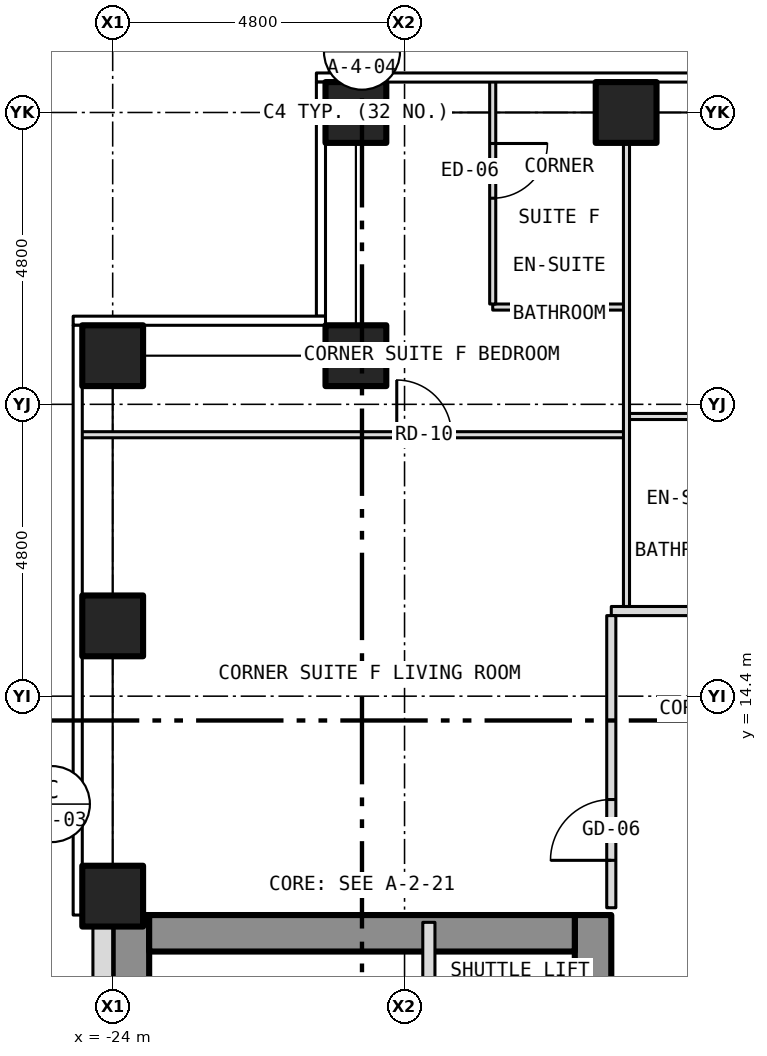
"""IFC4 building model, lengths in metres.
Left out: names, types, materials, properties, quantities, classifications, styles, units other than length and angle.
Written with IfcOpenShell. Run it as: python <this file> out.ifc"""

import sys

from ifc_helpers import new_model, si_unit, direction, frame, frame_2d, origin, origin_2d, place, context, subcontext, project, spatial, rectangle, hollow_rectangle, extrude, element, fill, save


model = new_model("IFC4")
c1 = context("Model", 3, precision=1e-05, world=origin(), true_north=direction((0.0, 1.0)))
c2 = subcontext(c1, "Body", "Model", "MODEL_VIEW")
j1 = project(units=[si_unit("LENGTHUNIT", "METRE"), si_unit("PLANEANGLEUNIT", "RADIAN")], contexts=[c1])
p1 = place(None, origin())
s1 = spatial("IfcSite", under=j1, at=p1, CompositionType="ELEMENT")
p2 = place(p1, origin())
s2 = spatial("IfcBuilding", under=s1, at=p2, CompositionType="ELEMENT")
p3 = place(p2, frame((0.0, 0.0, 77.5)))
s3 = spatial("IfcBuildingStorey", under=s2, at=p3, CompositionType="ELEMENT", Elevation=77.5)
for number, where, z_axis, x_axis in (
    (1, (-20.0, 24.0, -0.15), (0.0, 0.0, 1.0), (1.0, 0.0, 0.0)),
    (2, (-15.556, 24.0, -0.15), (0.0, 0.0, 1.0), (1.0, 0.0, 0.0)),
    (3, (-24.0, 11.111, -0.15), (0.0, 0.0, 1.0), (1.0, 0.0, 0.0)),
    (4, (-24.0, 15.556, -0.15), (0.0, 0.0, 1.0), (1.0, 0.0, 0.0)),
    (5, (-24.0, 20.0, -0.15), (0.0, 0.0, 1.0), (1.0, 0.0, 0.0)),
    (6, (-20.0, 20.0, -0.15), (0.0, 0.0, 1.0), (1.0, 0.0, 0.0)),
):
    element("IfcColumn", number, at=place(p3, frame(where, z_axis=z_axis, x_axis=x_axis)), inside=s3, PredefinedType="COLUMN", context=c2, shape_type="SweptSolid", body=[
        extrude(hollow_rectangle(XDim=1.0, YDim=1.0, WallThickness=0.06, at=origin_2d()), origin(), (0.0, 0.0, 1.0), 3.5),
    ])
p4 = place(p3, frame((-16.1, -10.8, 0.0), z_axis=(0.0, 0.0, 1.0), x_axis=(0.0, 1.0, 0.0)))
e7 = element("IfcWall", 7, at=p4, inside=s3, PredefinedType="SHEAR", context=c2, shape_type="SweptSolid", body=[
    extrude(rectangle(XDim=21.6, YDim=0.6, at=frame_2d((10.8, 0.0))), origin(), (0.0, 0.0, 1.0), 3.25),
])
p5 = place(p4, frame((9.4, 0.0, 0.0)))
e8 = element("IfcOpeningElement", 8, at=p5, cuts=e7, PredefinedType="OPENING", context=c2, shape_type="SweptSolid", body=[
    extrude(rectangle(XDim=1.1, YDim=2.1, at=frame_2d((0.55, 1.05))), frame((0.0, 0.312, 0.0), z_axis=(0.0, -1.0, 0.0), x_axis=(1.0, 0.0, 0.0)), (0.0, 0.0, 1.0), 0.624),
])
p6 = place(p4, frame((11.5, 0.0, 0.0)))
e9 = element("IfcOpeningElement", 9, at=p6, cuts=e7, PredefinedType="OPENING", context=c2, shape_type="SweptSolid", body=[
    extrude(rectangle(XDim=1.1, YDim=2.1, at=frame_2d((0.55, 1.05))), frame((0.0, 0.312, 0.0), z_axis=(0.0, -1.0, 0.0), x_axis=(1.0, 0.0, 0.0)), (0.0, 0.0, 1.0), 0.624),
])
p7 = place(p4, frame((13.6, 0.0, 0.0)))
e10 = element("IfcOpeningElement", 10, at=p7, cuts=e7, PredefinedType="OPENING", context=c2, shape_type="SweptSolid", body=[
    extrude(rectangle(XDim=1.1, YDim=2.1, at=frame_2d((0.55, 1.05))), frame((0.0, 0.312, 0.0), z_axis=(0.0, -1.0, 0.0), x_axis=(1.0, 0.0, 0.0)), (0.0, 0.0, 1.0), 0.624),
])
p8 = place(p4, frame((15.7, 0.0, 0.0)))
e11 = element("IfcOpeningElement", 11, at=p8, cuts=e7, PredefinedType="OPENING", context=c2, shape_type="SweptSolid", body=[
    extrude(rectangle(XDim=1.1, YDim=2.1, at=frame_2d((0.55, 1.05))), frame((0.0, 0.312, 0.0), z_axis=(0.0, -1.0, 0.0), x_axis=(1.0, 0.0, 0.0)), (0.0, 0.0, 1.0), 0.624),
])
p9 = place(p4, frame((17.8, 0.0, 0.0)))
e12 = element("IfcOpeningElement", 12, at=p9, cuts=e7, PredefinedType="OPENING", context=c2, shape_type="SweptSolid", body=[
    extrude(rectangle(XDim=1.1, YDim=2.1, at=frame_2d((0.55, 1.05))), frame((0.0, 0.312, 0.0), z_axis=(0.0, -1.0, 0.0), x_axis=(1.0, 0.0, 0.0)), (0.0, 0.0, 1.0), 0.624),
])
p10 = place(p4, frame((0.758, 0.0, 0.0)))
e13 = element("IfcOpeningElement", 13, at=p10, cuts=e7, PredefinedType="OPENING", context=c2, shape_type="SweptSolid", body=[
    extrude(rectangle(XDim=1.1, YDim=2.1, at=frame_2d((0.55, 1.05))), frame((0.0, 0.312, 0.0), z_axis=(0.0, -1.0, 0.0), x_axis=(1.0, 0.0, 0.0)), (0.0, 0.0, 1.0), 0.624),
])
p11 = place(p4, frame((7.5, 0.0, 0.0)))
e14 = element("IfcOpeningElement", 14, at=p11, cuts=e7, PredefinedType="OPENING", context=c2, shape_type="SweptSolid", body=[
    extrude(rectangle(XDim=1.1, YDim=2.1, at=frame_2d((0.55, 1.05))), frame((0.0, 0.312, 0.0), z_axis=(0.0, -1.0, 0.0), x_axis=(1.0, 0.0, 0.0)), (0.0, 0.0, 1.0), 0.624),
])
p12 = place(p3, frame((-23.7, -10.8, 0.0), z_axis=(0.0, 0.0, 1.0), x_axis=(0.0, 1.0, 0.0)))
e15 = element("IfcWall", 15, at=p12, inside=s3, PredefinedType="SHEAR", context=c2, shape_type="SweptSolid", body=[
    extrude(rectangle(XDim=21.6, YDim=0.6, at=frame_2d((10.8, 0.0))), origin(), (0.0, 0.0, 1.0), 3.25),
])
p13 = place(p3, frame((-23.4, 10.5, 0.0), z_axis=(0.0, 0.0, 1.0), x_axis=(1.0, 0.0, 0.0)))
e16 = element("IfcWall", 16, at=p13, inside=s3, PredefinedType="SHEAR", context=c2, shape_type="SweptSolid", body=[
    extrude(rectangle(XDim=7.0, YDim=0.6, at=frame_2d((3.5, 0.0))), origin(), (0.0, 0.0, 1.0), 3.25),
])
p14 = place(p3, frame((-24.163, 10.8, 0.0), z_axis=(0.0, 0.0, 1.0), x_axis=(0.0, -1.0, 0.0)))
e17 = element("IfcWall", 17, at=p14, inside=s3, PredefinedType="SOLIDWALL", context=c2, shape_type="SweptSolid", body=[
    extrude(rectangle(XDim=21.6, YDim=0.325, at=frame_2d((10.8, 0.0))), origin(), (0.0, 0.0, 1.0), 3.5),
])
p15 = place(p14, frame((18.05, 0.0, 1.0)))
e18 = element("IfcOpeningElement", 18, at=p15, cuts=e17, PredefinedType="OPENING", context=c2, shape_type="SweptSolid", body=[
    extrude(rectangle(XDim=0.6, YDim=1.5, at=frame_2d((0.3, 0.75))), frame((0.0, 0.175, 0.0), z_axis=(0.0, -1.0, 0.0), x_axis=(1.0, 0.0, 0.0)), (0.0, 0.0, 1.0), 0.349),
])
p16 = place(p3, frame((-15.8, 15.8, 0.0), z_axis=(0.0, 0.0, 1.0), x_axis=(1.0, 0.0, 0.0)))
e19 = element("IfcWall", 19, at=p16, inside=s3, PredefinedType="PARTITIONING", context=c2, shape_type="SweptSolid", body=[
    extrude(rectangle(XDim=6.68, YDim=0.15, at=frame_2d((3.34, 0.0))), origin(), (0.0, 0.0, 1.0), 3.35),
])
p17 = place(p16, frame((4.047, 0.0, 0.0)))
e20 = element("IfcOpeningElement", 20, at=p17, cuts=e19, PredefinedType="OPENING", context=c2, shape_type="SweptSolid", body=[
    extrude(rectangle(XDim=1.0, YDim=2.1, at=frame_2d((0.5, 1.05))), frame((0.0, 0.087, 0.0), z_axis=(0.0, -1.0, 0.0), x_axis=(1.0, 0.0, 0.0)), (0.0, 0.0, 1.0), 0.174),
])
p18 = place(p3, frame((-24.53, 18.7, 0.0), z_axis=(0.0, 0.0, 1.0), x_axis=(1.0, 0.0, 0.0)))
e21 = element("IfcWall", 21, at=p18, inside=s3, PredefinedType="PARTITIONING", context=c2, shape_type="SweptSolid", body=[
    extrude(rectangle(XDim=8.98, YDim=0.1, at=frame_2d((4.49, 0.0))), origin(), (0.0, 0.0, 1.0), 3.35),
])
p19 = place(p18, frame((5.202, 0.0, 0.0)))
e22 = element("IfcOpeningElement", 22, at=p19, cuts=e21, PredefinedType="OPENING", context=c2, shape_type="SweptSolid", body=[
    extrude(rectangle(XDim=0.9, YDim=2.1, at=frame_2d((0.45, 1.05))), frame((0.0, 0.062, 0.0), z_axis=(0.0, -1.0, 0.0), x_axis=(1.0, 0.0, 0.0)), (0.0, 0.0, 1.0), 0.124),
])
for number, where, z_axis, x_axis in (
    (23, (-15.55, 19.0, 0.0), (0.0, 0.0, 1.0), (1.0, 0.0, 0.0)),
    (24, (-17.75, 20.8, 0.0), (0.0, 0.0, 1.0), (1.0, 0.0, 0.0)),
):
    element("IfcWall", number, at=place(p3, frame(where, z_axis=z_axis, x_axis=x_axis)), inside=s3, PredefinedType="PARTITIONING", context=c2, shape_type="SweptSolid", body=[
        extrude(rectangle(XDim=2.2, YDim=0.1, at=frame_2d((1.1, 0.0))), origin(), (0.0, 0.0, 1.0), 3.35),
    ])
p20 = place(p3, frame((-18.8, -1.8, 0.0), z_axis=(0.0, 0.0, 1.0), x_axis=(0.0, 1.0, 0.0)))
e25 = element("IfcWall", 25, at=p20, inside=s3, PredefinedType="PARTITIONING", context=c2, shape_type="SweptSolid", body=[
    extrude(rectangle(XDim=12.48, YDim=0.2, at=frame_2d((6.24, 0.0))), origin(), (0.0, 0.0, 1.0), 3.25),
])
p21 = place(p3, frame((-17.75, 20.85, 0.0), z_axis=(0.0, 0.0, 1.0), x_axis=(0.0, 1.0, 0.0)))
e26 = element("IfcWall", 26, at=p21, inside=s3, PredefinedType="PARTITIONING", context=c2, shape_type="SweptSolid", body=[
    extrude(rectangle(XDim=3.68, YDim=0.1, at=frame_2d((1.84, 0.0))), origin(), (0.0, 0.0, 1.0), 3.35),
])
p22 = place(p21, frame((1.74, 0.0, 0.0)))
e27 = element("IfcOpeningElement", 27, at=p22, cuts=e26, PredefinedType="OPENING", context=c2, shape_type="SweptSolid", body=[
    extrude(rectangle(XDim=0.9, YDim=2.1, at=frame_2d((0.45, 1.05))), frame((0.0, 0.062, 0.0), z_axis=(0.0, -1.0, 0.0), x_axis=(1.0, 0.0, 0.0)), (0.0, 0.0, 1.0), 0.124),
])
p23 = place(p3, frame((-15.8, 10.92, 0.0), z_axis=(0.0, 0.0, 1.0), x_axis=(0.0, 1.0, 0.0)))
e28 = element("IfcWall", 28, at=p23, inside=s3, PredefinedType="PARTITIONING", context=c2, shape_type="SweptSolid", body=[
    extrude(rectangle(XDim=4.805, YDim=0.15, at=frame_2d((2.403, 0.0))), origin(), (0.0, 0.0, 1.0), 3.35),
])
p24 = place(p23, frame((0.78, 0.0, 0.0)))
e29 = element("IfcOpeningElement", 29, at=p24, cuts=e28, PredefinedType="OPENING", context=c2, shape_type="SweptSolid", body=[
    extrude(rectangle(XDim=1.0, YDim=2.1, at=frame_2d((0.5, 1.05))), frame((0.0, 0.087, 0.0), z_axis=(0.0, -1.0, 0.0), x_axis=(1.0, 0.0, 0.0)), (0.0, 0.0, 1.0), 0.174),
])
p25 = place(p3, frame((-15.55, 15.875, 0.0), z_axis=(0.0, 0.0, 1.0), x_axis=(0.0, 1.0, 0.0)))
e30 = element("IfcWall", 30, at=p25, inside=s3, PredefinedType="PARTITIONING", context=c2, shape_type="SweptSolid", body=[
    extrude(rectangle(XDim=8.005, YDim=0.1, at=frame_2d((4.002, 0.0))), origin(), (0.0, 0.0, 1.0), 3.35),
])
p26 = place(p24, origin())
e31 = element("IfcDoor", 31, at=p26, inside=s3, OperationType="SINGLE_SWING_LEFT", PredefinedType="DOOR", context=c2, shape_type="SweptSolid", body=[
    extrude(rectangle(XDim=1.0, YDim=2.1, at=frame_2d((0.5, 1.05))), frame((0.0, 0.025, 0.0), z_axis=(0.0, -1.0, 0.0), x_axis=(1.0, 0.0, 0.0)), (0.0, 0.0, 1.0), 0.05),
])
fill(e29, e31)
p27 = place(p19, origin())
e32 = element("IfcDoor", 32, at=p27, inside=s3, OperationType="SINGLE_SWING_LEFT", PredefinedType="DOOR", context=c2, shape_type="SweptSolid", body=[
    extrude(rectangle(XDim=0.9, YDim=2.1, at=frame_2d((0.45, 1.05))), frame((0.0, 0.025, 0.0), z_axis=(0.0, -1.0, 0.0), x_axis=(1.0, 0.0, 0.0)), (0.0, 0.0, 1.0), 0.05),
])
fill(e22, e32)
p28 = place(p22, origin())
e33 = element("IfcDoor", 33, at=p28, inside=s3, OperationType="SINGLE_SWING_RIGHT", PredefinedType="DOOR", context=c2, shape_type="SweptSolid", body=[
    extrude(rectangle(XDim=0.9, YDim=2.1, at=frame_2d((0.45, 1.05))), frame((0.0, 0.025, 0.0), z_axis=(0.0, -1.0, 0.0), x_axis=(1.0, 0.0, 0.0)), (0.0, 0.0, 1.0), 0.05),
])
fill(e27, e33)
save(model, sys.argv[1])
